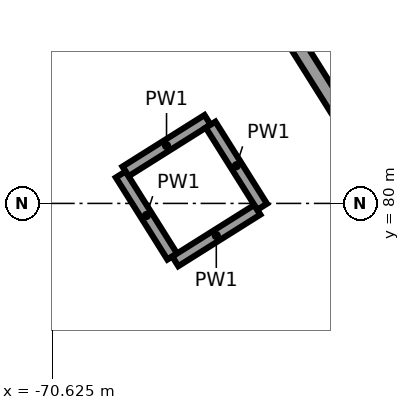
"""IFC4 building model, lengths in metres.
Left out: names, types, materials, properties, quantities, classifications, styles, units other than length and angle.
Written with IfcOpenShell. Run it as: python <this file> out.ifc"""

import sys

from ifc_helpers import new_model, si_unit, direction, frame, frame_2d, origin, place, context, subcontext, project, spatial, rectangle, extrude, element, save


model = new_model("IFC4")
c1 = context("Model", 3, precision=1e-05, world=origin(), true_north=direction((0.0, 1.0)))
c2 = subcontext(c1, "Body", "Model", "MODEL_VIEW")
j1 = project(units=[si_unit("LENGTHUNIT", "METRE"), si_unit("PLANEANGLEUNIT", "RADIAN")], contexts=[c1])
p1 = place(None, origin())
s1 = spatial("IfcSite", under=j1, at=p1, CompositionType="ELEMENT")
p2 = place(p1, origin())
s2 = spatial("IfcBuilding", under=s1, at=p2, CompositionType="ELEMENT")
p3 = place(p2, frame((0.0, 0.0, 6.5)))
s3 = spatial("IfcBuildingStorey", under=s2, at=p3, CompositionType="ELEMENT", Elevation=6.5)
p4 = place(p3, frame((-67.437, 82.143, 0.0), z_axis=(0.0, 0.0, 1.0), x_axis=(0.532038212918, -0.84672034344, 0.0)))
e1 = element("IfcWall", 1, at=p4, inside=s3, PredefinedType="SHEAR", context=c2, shape_type="SweptSolid", body=[
    extrude(rectangle(XDim=3.0, YDim=0.2, at=frame_2d((1.5, 0.0))), origin(), (0.0, 0.0, 1.0), 5.15),
])
for number, where, z_axis, x_axis in (
    (2, (-68.582, 81.099, 0.0), (0.0, 0.0, 1.0), (-0.847, -0.532, 0.0)),
    (3, (-69.725, 80.381, 0.0), (0.0, 0.0, 1.0), (0.532, -0.847, 0.0)),
):
    element("IfcWall", number, at=place(p3, frame(where, z_axis=z_axis, x_axis=x_axis)), inside=s3, PredefinedType="PARTITIONING", context=c2, shape_type="SweptSolid", body=[
        extrude(rectangle(XDim=1.275, YDim=0.15, at=frame_2d((0.638, 0.0))), origin(), (0.0, 0.0, 1.0), 5.15),
    ])
for number, where, z_axis, x_axis in (
    (4, (-69.007, 79.238, 0.0), (0.0, 0.0, 1.0), (0.847, 0.532, 0.0)),
    (5, (-67.864, 79.956, 0.0), (0.0, 0.0, 1.0), (-0.532, 0.847, 0.0)),
):
    element("IfcWall", number, at=place(p3, frame(where, z_axis=z_axis, x_axis=x_axis)), inside=s3, PredefinedType="PARTITIONING", context=c2, shape_type="SweptSolid", body=[
        extrude(rectangle(XDim=1.275, YDim=0.15, at=frame_2d((0.637, 0.0))), origin(), (0.0, 0.0, 1.0), 5.15),
    ])
p5 = place(p3, frame((-72.143, 78.552, 0.0), z_axis=(0.0, 0.0, 1.0), x_axis=(0.532063867314, -0.846704222913, 0.0)))
e6 = element("IfcWall", 6, at=p5, inside=s3, PredefinedType="PARTITIONING", context=c2, shape_type="SweptSolid", body=[
    extrude(rectangle(XDim=5.108, YDim=0.15, at=frame_2d((2.554, 0.0))), origin(), (0.0, 0.0, 1.0), 4.05),
])
p6 = place(p5, frame((3.15, 0.0, 0.0)))
e7 = element("IfcOpeningElement", 7, at=p6, cuts=e6, PredefinedType="OPENING", context=c2, shape_type="SweptSolid", body=[
    extrude(rectangle(XDim=1.8, YDim=2.1, at=frame_2d((0.9, 1.05))), frame((0.0, 0.085, 0.0), z_axis=(0.0, -1.0, 0.0), x_axis=(1.0, 0.0, 0.0)), (0.0, 0.0, 1.0), 0.17),
])
p7 = place(p5, frame((0.05, 0.0, 0.0)))
e8 = element("IfcOpeningElement", 8, at=p7, cuts=e6, PredefinedType="OPENING", context=c2, shape_type="SweptSolid", body=[
    extrude(rectangle(XDim=1.8, YDim=2.1, at=frame_2d((0.9, 1.05))), frame((0.0, 0.085, 0.0), z_axis=(0.0, -1.0, 0.0), x_axis=(1.0, 0.0, 0.0)), (0.0, 0.0, 1.0), 0.17),
])
save(model, sys.argv[1])
